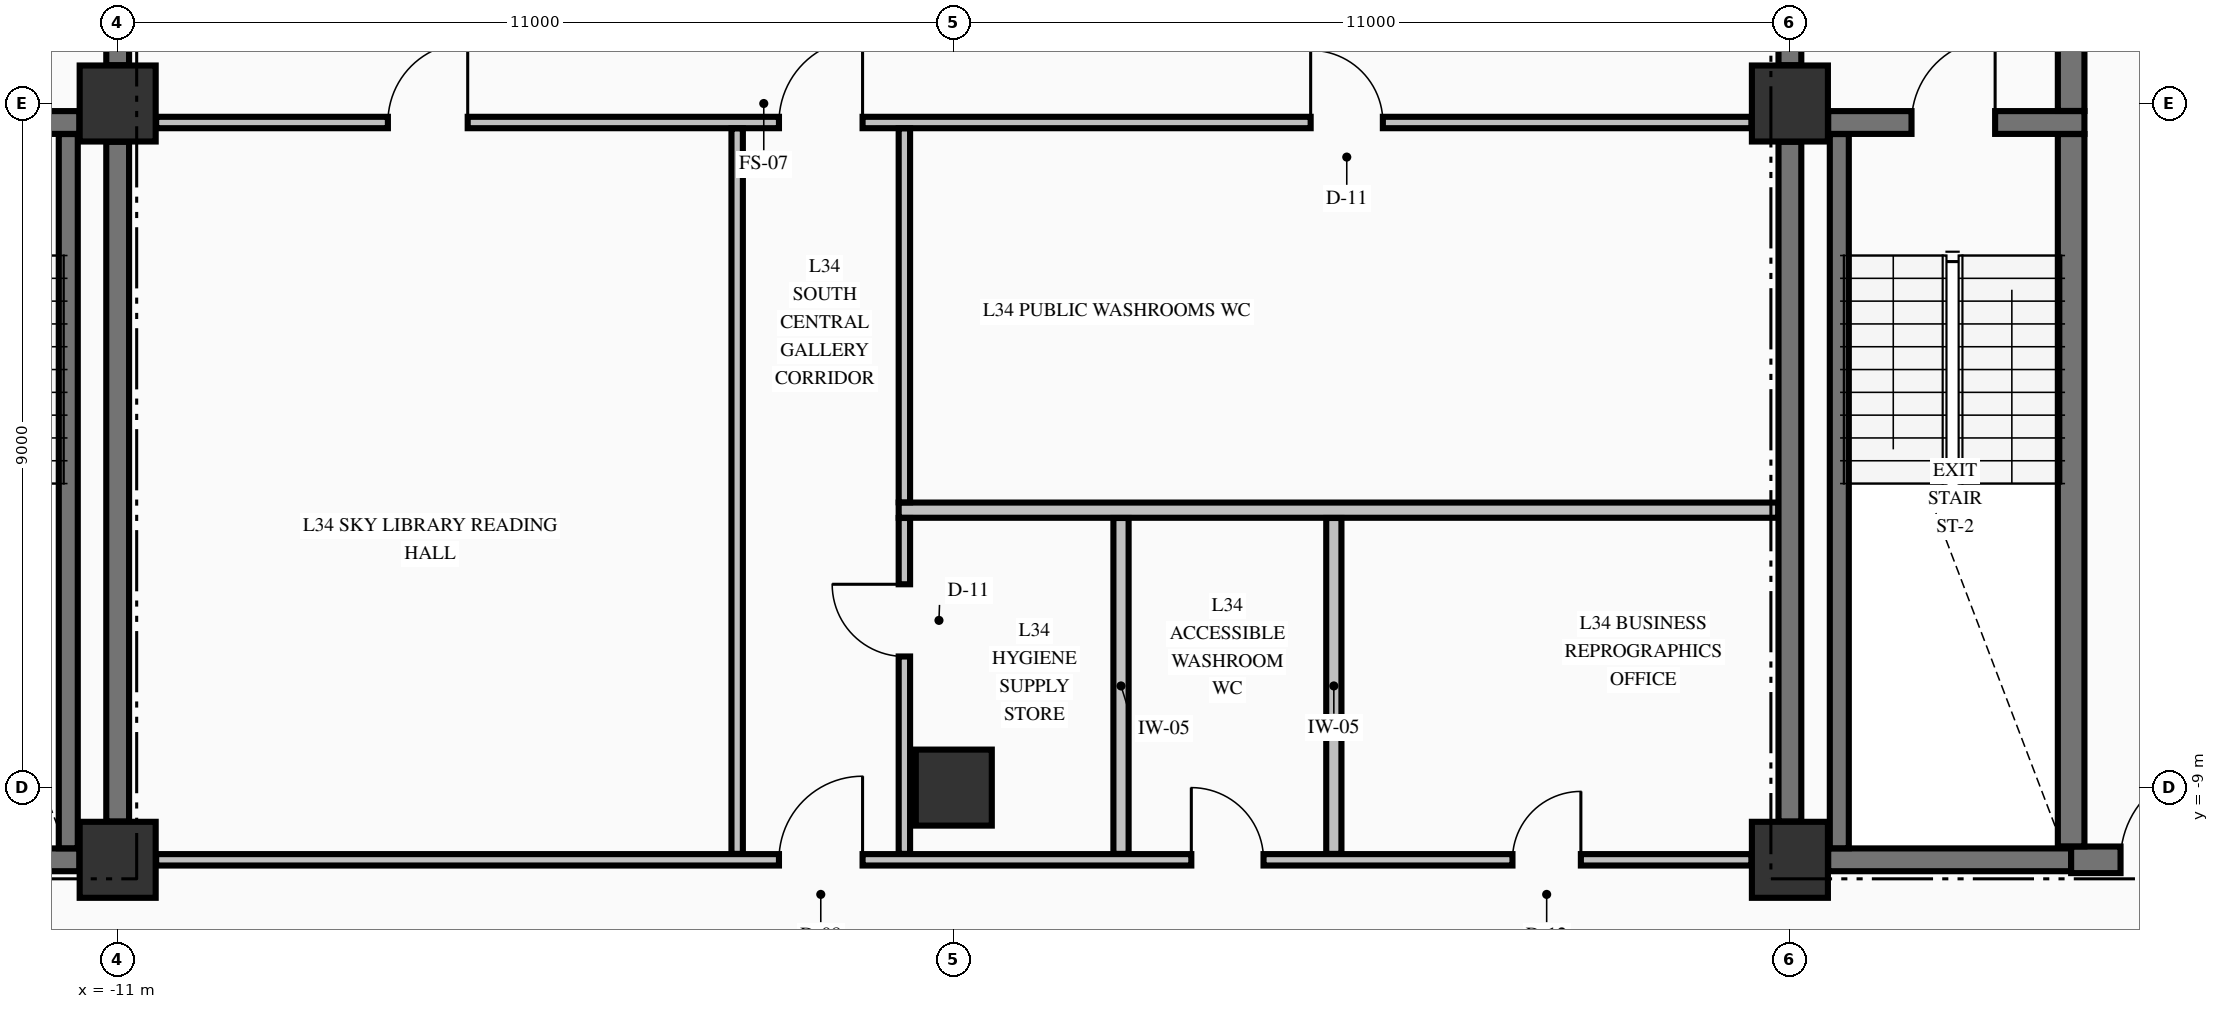
"""IFC4 building model, lengths in metres.
Left out: names, types, materials, properties, quantities, classifications, styles, units other than length and angle.
Written with IfcOpenShell. Run it as: python <this file> out.ifc"""

import sys

from ifc_helpers import new_model, si_unit, direction, frame, frame_2d, origin, origin_2d, place, context, subcontext, project, spatial, rectangle, extrude, element, fill, save


model = new_model("IFC4")
c1 = context("Model", 3, precision=1e-05, world=origin(), true_north=direction((0.0, 1.0)))
c2 = subcontext(c1, "Body", "Model", "MODEL_VIEW")
j1 = project(units=[si_unit("LENGTHUNIT", "METRE"), si_unit("PLANEANGLEUNIT", "RADIAN")], contexts=[c1])
p1 = place(None, origin())
s1 = spatial("IfcSite", under=j1, at=p1, CompositionType="ELEMENT")
p2 = place(p1, origin())
s2 = spatial("IfcBuilding", under=s1, at=p2, CompositionType="ELEMENT")
p3 = place(p2, frame((0.0, 0.0, 135.63)))
s3 = spatial("IfcBuildingStorey", under=s2, at=p3, CompositionType="ELEMENT", Elevation=135.63)
for number, where, z_axis, x_axis in (
    (1, (-11.0, -9.95, -0.25), (0.0, 0.0, 1.0), (1.0, 0.0, 0.0)),
    (2, (-11.0, 0.0, -0.25), (0.0, 0.0, 1.0), (1.0, 0.0, 0.0)),
    (3, (11.0, -9.95, -0.25), (0.0, 0.0, 1.0), (1.0, 0.0, 0.0)),
    (4, (11.0, 0.0, -0.25), (0.0, 0.0, 1.0), (1.0, 0.0, 0.0)),
    (5, (0.0, -9.0, -0.25), (0.0, 0.0, 1.0), (1.0, 0.0, 0.0)),
):
    element("IfcColumn", number, at=place(p3, frame(where, z_axis=z_axis, x_axis=x_axis)), inside=s3, PredefinedType="COLUMN", context=c2, shape_type="SweptSolid", body=[
        extrude(rectangle(XDim=1.0, YDim=1.0, at=origin_2d()), origin(), (0.0, 0.0, 1.0), 3.57),
    ])
for number, where, z_axis, x_axis in (
    (6, (-14.7, -9.95, 0.0), (0.0, 0.0, 1.0), (1.0, 0.0, 0.0)),
    (7, (11.504, -9.95, 0.0), (0.0, 0.0, 1.0), (1.0, 0.0, 0.0)),
):
    element("IfcWall", number, at=place(p3, frame(where, z_axis=z_axis, x_axis=x_axis)), inside=s3, PredefinedType="SHEAR", context=c2, shape_type="SweptSolid", body=[
        extrude(rectangle(XDim=3.196, YDim=0.3, at=frame_2d((1.598, 0.0))), origin(), (0.0, 0.0, 1.0), 3.32),
    ])
p4 = place(p3, frame((14.7, -9.95, 0.0), z_axis=(0.0, 0.0, 1.0), x_axis=(1.0, 0.0, 0.0)))
e8 = element("IfcWall", 8, at=p4, inside=s3, PredefinedType="SHEAR", context=c2, shape_type="SweptSolid", body=[
    extrude(rectangle(XDim=4.796, YDim=0.35, at=frame_2d((2.398, 0.0))), origin(), (0.0, 0.0, 1.0), 3.32),
])
p5 = place(p4, frame((0.65, 0.0, 0.0)))
e9 = element("IfcOpeningElement", 9, at=p5, cuts=e8, PredefinedType="OPENING", context=c2, shape_type="SweptSolid", body=[
    extrude(rectangle(XDim=1.2, YDim=2.15, at=frame_2d((0.6, 1.075))), frame((0.0, 0.185, 0.0), z_axis=(0.0, -1.0, 0.0), x_axis=(1.0, 0.0, 0.0)), (0.0, 0.0, 1.0), 0.37),
])
p6 = place(p3, frame((-19.496, -0.25, 0.0), z_axis=(0.0, 0.0, 1.0), x_axis=(1.0, 0.0, 0.0)))
e10 = element("IfcWall", 10, at=p6, inside=s3, PredefinedType="SHEAR", context=c2, shape_type="SweptSolid", body=[
    extrude(rectangle(XDim=7.992, YDim=0.3, at=frame_2d((3.996, 0.0))), origin(), (0.0, 0.0, 1.0), 3.32),
])
p7 = place(p6, frame((5.796, 0.0, 0.0)))
e11 = element("IfcOpeningElement", 11, at=p7, cuts=e10, PredefinedType="OPENING", context=c2, shape_type="SweptSolid", body=[
    extrude(rectangle(XDim=1.1, YDim=2.15, at=frame_2d((0.55, 1.075))), frame((0.0, 0.16, 0.0), z_axis=(0.0, -1.0, 0.0), x_axis=(1.0, 0.0, 0.0)), (0.0, 0.0, 1.0), 0.32),
])
p8 = place(p3, frame((11.504, -0.25, 0.0), z_axis=(0.0, 0.0, 1.0), x_axis=(1.0, 0.0, 0.0)))
e12 = element("IfcWall", 12, at=p8, inside=s3, PredefinedType="SHEAR", context=c2, shape_type="SweptSolid", body=[
    extrude(rectangle(XDim=3.371, YDim=0.3, at=frame_2d((1.686, 0.0))), origin(), (0.0, 0.0, 1.0), 3.32),
])
p9 = place(p8, frame((1.096, 0.0, 0.0)))
e13 = element("IfcOpeningElement", 13, at=p9, cuts=e12, PredefinedType="OPENING", context=c2, shape_type="SweptSolid", body=[
    extrude(rectangle(XDim=1.1, YDim=2.15, at=frame_2d((0.55, 1.075))), frame((0.0, 0.16, 0.0), z_axis=(0.0, -1.0, 0.0), x_axis=(1.0, 0.0, 0.0)), (0.0, 0.0, 1.0), 0.32),
])
p10 = place(p3, frame((-10.494, -9.95, 0.0), z_axis=(0.0, 0.0, 1.0), x_axis=(1.0, 0.0, 0.0)))
e14 = element("IfcWall", 14, at=p10, inside=s3, PredefinedType="PARTITIONING", context=c2, shape_type="SweptSolid", body=[
    extrude(rectangle(XDim=20.988, YDim=0.15, at=frame_2d((10.494, 0.0))), origin(), (0.0, 0.0, 1.0), 3.32),
])
p11 = place(p10, frame((8.194, 0.0, 0.0)))
e15 = element("IfcOpeningElement", 15, at=p11, cuts=e14, PredefinedType="OPENING", context=c2, shape_type="SweptSolid", body=[
    extrude(rectangle(XDim=1.1, YDim=2.15, at=frame_2d((0.55, 1.075))), frame((0.0, 0.085, 0.0), z_axis=(0.0, -1.0, 0.0), x_axis=(1.0, 0.0, 0.0)), (0.0, 0.0, 1.0), 0.17),
])
p12 = place(p10, frame((13.619, 0.0, 0.0)))
e16 = element("IfcOpeningElement", 16, at=p12, cuts=e14, PredefinedType="OPENING", context=c2, shape_type="SweptSolid", body=[
    extrude(rectangle(XDim=0.95, YDim=2.15, at=frame_2d((0.475, 1.075))), frame((0.0, 0.085, 0.0), z_axis=(0.0, -1.0, 0.0), x_axis=(1.0, 0.0, 0.0)), (0.0, 0.0, 1.0), 0.17),
])
p13 = place(p10, frame((17.844, 0.0, 0.0)))
e17 = element("IfcOpeningElement", 17, at=p13, cuts=e14, PredefinedType="OPENING", context=c2, shape_type="SweptSolid", body=[
    extrude(rectangle(XDim=0.9, YDim=2.15, at=frame_2d((0.45, 1.075))), frame((0.0, 0.085, 0.0), z_axis=(0.0, -1.0, 0.0), x_axis=(1.0, 0.0, 0.0)), (0.0, 0.0, 1.0), 0.17),
])
p14 = place(p3, frame((-0.725, -5.35, 0.0), z_axis=(0.0, 0.0, 1.0), x_axis=(1.0, 0.0, 0.0)))
e18 = element("IfcWall", 18, at=p14, inside=s3, PredefinedType="PARTITIONING", context=c2, shape_type="SweptSolid", body=[
    extrude(rectangle(XDim=11.572, YDim=0.2, at=frame_2d((5.786, 0.0))), origin(), (0.0, 0.0, 1.0), 3.32),
])
p15 = place(p3, frame((-10.494, -0.25, 0.0), z_axis=(0.0, 0.0, 1.0), x_axis=(1.0, 0.0, 0.0)))
e19 = element("IfcWall", 19, at=p15, inside=s3, PredefinedType="PARTITIONING", context=c2, shape_type="SweptSolid", body=[
    extrude(rectangle(XDim=20.988, YDim=0.15, at=frame_2d((10.494, 0.0))), origin(), (0.0, 0.0, 1.0), 3.32),
])
p16 = place(p15, frame((8.194, 0.0, 0.0)))
e20 = element("IfcOpeningElement", 20, at=p16, cuts=e19, PredefinedType="OPENING", context=c2, shape_type="SweptSolid", body=[
    extrude(rectangle(XDim=1.1, YDim=2.15, at=frame_2d((0.55, 1.075))), frame((0.0, 0.085, 0.0), z_axis=(0.0, -1.0, 0.0), x_axis=(1.0, 0.0, 0.0)), (0.0, 0.0, 1.0), 0.17),
])
p17 = place(p15, frame((3.049, 0.0, 0.0)))
e21 = element("IfcOpeningElement", 21, at=p17, cuts=e19, PredefinedType="OPENING", context=c2, shape_type="SweptSolid", body=[
    extrude(rectangle(XDim=1.05, YDim=2.15, at=frame_2d((0.525, 1.075))), frame((0.0, 0.085, 0.0), z_axis=(0.0, -1.0, 0.0), x_axis=(1.0, 0.0, 0.0)), (0.0, 0.0, 1.0), 0.17),
])
p18 = place(p15, frame((15.189, 0.0, 0.0)))
e22 = element("IfcOpeningElement", 22, at=p18, cuts=e19, PredefinedType="OPENING", context=c2, shape_type="SweptSolid", body=[
    extrude(rectangle(XDim=0.95, YDim=2.15, at=frame_2d((0.475, 1.075))), frame((0.0, 0.085, 0.0), z_axis=(0.0, -1.0, 0.0), x_axis=(1.0, 0.0, 0.0)), (0.0, 0.0, 1.0), 0.17),
])
p19 = place(p3, frame((-11.65, -9.798, 0.0), z_axis=(0.0, 0.0, 1.0), x_axis=(0.0, 1.0, 0.0)))
e23 = element("IfcWall", 23, at=p19, inside=s3, PredefinedType="SOLIDWALL", context=c2, shape_type="SweptSolid", body=[
    extrude(rectangle(XDim=9.396, YDim=0.25, at=frame_2d((4.698, 0.0))), origin(), (0.0, 0.0, 1.0), 3.32),
])
p20 = place(p3, frame((-11.0, -9.446, 0.0), z_axis=(0.0, 0.0, 1.0), x_axis=(0.0, 1.0, 0.0)))
e24 = element("IfcWall", 24, at=p20, inside=s3, PredefinedType="SHEAR", context=c2, shape_type="SweptSolid", body=[
    extrude(rectangle(XDim=8.942, YDim=0.3, at=frame_2d((4.471, 0.0))), origin(), (0.0, 0.0, 1.0), 3.32),
])
p21 = place(p3, frame((-11.0, 0.504, 0.0), z_axis=(0.0, 0.0, 1.0), x_axis=(0.0, 1.0, 0.0)))
e25 = element("IfcWall", 25, at=p21, inside=s3, PredefinedType="SHEAR", context=c2, shape_type="SweptSolid", body=[
    extrude(rectangle(XDim=2.244, YDim=0.3, at=frame_2d((1.122, 0.0))), origin(), (0.0, 0.0, 1.0), 3.32),
])
p22 = place(p21, frame((0.596, 0.0, 0.0)))
e26 = element("IfcOpeningElement", 26, at=p22, cuts=e25, PredefinedType="OPENING", context=c2, shape_type="SweptSolid", body=[
    extrude(rectangle(XDim=1.1, YDim=2.15, at=frame_2d((0.55, 1.075))), frame((0.0, 0.16, 0.0), z_axis=(0.0, -1.0, 0.0), x_axis=(1.0, 0.0, 0.0)), (0.0, 0.0, 1.0), 0.32),
])
p23 = place(p3, frame((11.0, -9.446, 0.0), z_axis=(0.0, 0.0, 1.0), x_axis=(0.0, 1.0, 0.0)))
e27 = element("IfcWall", 27, at=p23, inside=s3, PredefinedType="SHEAR", context=c2, shape_type="SweptSolid", body=[
    extrude(rectangle(XDim=8.942, YDim=0.3, at=frame_2d((4.471, 0.0))), origin(), (0.0, 0.0, 1.0), 3.32),
])
p24 = place(p3, frame((11.0, 0.504, 0.0), z_axis=(0.0, 0.0, 1.0), x_axis=(0.0, 1.0, 0.0)))
e28 = element("IfcWall", 28, at=p24, inside=s3, PredefinedType="SHEAR", context=c2, shape_type="SweptSolid", body=[
    extrude(rectangle(XDim=2.244, YDim=0.3, at=frame_2d((1.122, 0.0))), origin(), (0.0, 0.0, 1.0), 3.32),
])
p25 = place(p24, frame((0.596, 0.0, 0.0)))
e29 = element("IfcOpeningElement", 29, at=p25, cuts=e28, PredefinedType="OPENING", context=c2, shape_type="SweptSolid", body=[
    extrude(rectangle(XDim=1.1, YDim=2.15, at=frame_2d((0.55, 1.075))), frame((0.0, 0.16, 0.0), z_axis=(0.0, -1.0, 0.0), x_axis=(1.0, 0.0, 0.0)), (0.0, 0.0, 1.0), 0.32),
])
p26 = place(p3, frame((11.65, -9.798, 0.0), z_axis=(0.0, 0.0, 1.0), x_axis=(0.0, 1.0, 0.0)))
e30 = element("IfcWall", 30, at=p26, inside=s3, PredefinedType="SOLIDWALL", context=c2, shape_type="SweptSolid", body=[
    extrude(rectangle(XDim=9.396, YDim=0.25, at=frame_2d((4.698, 0.0))), origin(), (0.0, 0.0, 1.0), 3.32),
])
p27 = place(p3, frame((14.7, -9.773, 0.0), z_axis=(0.0, 0.0, 1.0), x_axis=(0.0, 1.0, 0.0)))
e31 = element("IfcWall", 31, at=p27, inside=s3, PredefinedType="SHEAR", context=c2, shape_type="SweptSolid", body=[
    extrude(rectangle(XDim=9.371, YDim=0.35, at=frame_2d((4.686, 0.0))), origin(), (0.0, 0.0, 1.0), 3.32),
])
p28 = place(p3, frame((14.7, -0.098, 0.0), z_axis=(0.0, 0.0, 1.0), x_axis=(0.0, 1.0, 0.0)))
e32 = element("IfcWall", 32, at=p28, inside=s3, PredefinedType="SHEAR", context=c2, shape_type="SweptSolid", body=[
    extrude(rectangle(XDim=2.846, YDim=0.35, at=frame_2d((1.423, 0.0))), origin(), (0.0, 0.0, 1.0), 3.32),
])
p29 = place(p3, frame((-2.85, -9.872, 0.0), z_axis=(0.0, 0.0, 1.0), x_axis=(0.0, 1.0, 0.0)))
e33 = element("IfcWall", 33, at=p29, inside=s3, PredefinedType="PARTITIONING", context=c2, shape_type="SweptSolid", body=[
    extrude(rectangle(XDim=9.544, YDim=0.15, at=frame_2d((4.772, 0.0))), origin(), (0.0, 0.0, 1.0), 3.32),
])
p30 = place(p3, frame((-0.65, -9.872, 0.0), z_axis=(0.0, 0.0, 1.0), x_axis=(0.0, 1.0, 0.0)))
e34 = element("IfcWall", 34, at=p30, inside=s3, PredefinedType="PARTITIONING", context=c2, shape_type="SweptSolid", body=[
    extrude(rectangle(XDim=4.419, YDim=0.15, at=frame_2d((2.209, 0.0))), origin(), (0.0, 0.0, 1.0), 3.32),
])
p31 = place(p30, frame((2.597, 0.0, 0.0)))
e35 = element("IfcOpeningElement", 35, at=p31, cuts=e34, PredefinedType="OPENING", context=c2, shape_type="SweptSolid", body=[
    extrude(rectangle(XDim=0.95, YDim=2.15, at=frame_2d((0.475, 1.075))), frame((0.0, 0.085, 0.0), z_axis=(0.0, -1.0, 0.0), x_axis=(1.0, 0.0, 0.0)), (0.0, 0.0, 1.0), 0.17),
])
p32 = place(p3, frame((-0.65, -5.247, 0.0), z_axis=(0.0, 0.0, 1.0), x_axis=(0.0, 1.0, 0.0)))
e36 = element("IfcWall", 36, at=p32, inside=s3, PredefinedType="PARTITIONING", context=c2, shape_type="SweptSolid", body=[
    extrude(rectangle(XDim=4.919, YDim=0.15, at=frame_2d((2.459, 0.0))), origin(), (0.0, 0.0, 1.0), 3.32),
])
for number, where, z_axis, x_axis in (
    (37, (2.2, -9.872, 0.0), (0.0, 0.0, 1.0), (0.0, 1.0, 0.0)),
    (38, (5.0, -9.872, 0.0), (0.0, 0.0, 1.0), (0.0, 1.0, 0.0)),
):
    element("IfcWall", number, at=place(p3, frame(where, z_axis=z_axis, x_axis=x_axis)), inside=s3, PredefinedType="PARTITIONING", context=c2, shape_type="SweptSolid", body=[
        extrude(rectangle(XDim=4.419, YDim=0.2, at=frame_2d((2.209, 0.0))), origin(), (0.0, 0.0, 1.0), 3.32),
    ])
p33 = place(p9, origin())
e39 = element("IfcDoor", 39, at=p33, inside=s3, OperationType="SINGLE_SWING_RIGHT", PredefinedType="DOOR", context=c2, shape_type="SweptSolid", body=[
    extrude(rectangle(XDim=1.1, YDim=2.15, at=frame_2d((0.55, 1.075))), frame((0.0, 0.025, 0.0), z_axis=(0.0, -1.0, 0.0), x_axis=(1.0, 0.0, 0.0)), (0.0, 0.0, 1.0), 0.05),
])
fill(e13, e39)
p34 = place(p5, origin())
e40 = element("IfcDoor", 40, at=p34, inside=s3, OperationType="SINGLE_SWING_RIGHT", PredefinedType="DOOR", context=c2, shape_type="SweptSolid", body=[
    extrude(rectangle(XDim=1.2, YDim=2.15, at=frame_2d((0.6, 1.075))), frame((0.0, 0.025, 0.0), z_axis=(0.0, -1.0, 0.0), x_axis=(1.0, 0.0, 0.0)), (0.0, 0.0, 1.0), 0.05),
])
fill(e9, e40)
p35 = place(p11, origin())
e41 = element("IfcDoor", 41, at=p35, inside=s3, OperationType="SINGLE_SWING_RIGHT", PredefinedType="DOOR", context=c2, shape_type="SweptSolid", body=[
    extrude(rectangle(XDim=1.1, YDim=2.15, at=frame_2d((0.55, 1.075))), frame((0.0, 0.025, 0.0), z_axis=(0.0, -1.0, 0.0), x_axis=(1.0, 0.0, 0.0)), (0.0, 0.0, 1.0), 0.05),
])
fill(e15, e41)
p36 = place(p16, origin())
e42 = element("IfcDoor", 42, at=p36, inside=s3, OperationType="SINGLE_SWING_RIGHT", PredefinedType="DOOR", context=c2, shape_type="SweptSolid", body=[
    extrude(rectangle(XDim=1.1, YDim=2.15, at=frame_2d((0.55, 1.075))), frame((0.0, 0.025, 0.0), z_axis=(0.0, -1.0, 0.0), x_axis=(1.0, 0.0, 0.0)), (0.0, 0.0, 1.0), 0.05),
])
fill(e20, e42)
p37 = place(p17, origin())
e43 = element("IfcDoor", 43, at=p37, inside=s3, OperationType="SINGLE_SWING_RIGHT", PredefinedType="DOOR", context=c2, shape_type="SweptSolid", body=[
    extrude(rectangle(XDim=1.05, YDim=2.15, at=frame_2d((0.525, 1.075))), frame((0.0, 0.025, 0.0), z_axis=(0.0, -1.0, 0.0), x_axis=(1.0, 0.0, 0.0)), (0.0, 0.0, 1.0), 0.05),
])
fill(e21, e43)
p38 = place(p18, origin())
e44 = element("IfcDoor", 44, at=p38, inside=s3, OperationType="SINGLE_SWING_LEFT", PredefinedType="DOOR", context=c2, shape_type="SweptSolid", body=[
    extrude(rectangle(XDim=0.95, YDim=2.15, at=frame_2d((0.475, 1.075))), frame((0.0, 0.025, 0.0), z_axis=(0.0, -1.0, 0.0), x_axis=(1.0, 0.0, 0.0)), (0.0, 0.0, 1.0), 0.05),
])
fill(e22, e44)
p39 = place(p31, origin())
e45 = element("IfcDoor", 45, at=p39, inside=s3, OperationType="SINGLE_SWING_RIGHT", PredefinedType="DOOR", context=c2, shape_type="SweptSolid", body=[
    extrude(rectangle(XDim=0.95, YDim=2.15, at=frame_2d((0.475, 1.075))), frame((0.0, 0.025, 0.0), z_axis=(0.0, -1.0, 0.0), x_axis=(1.0, 0.0, 0.0)), (0.0, 0.0, 1.0), 0.05),
])
fill(e35, e45)
p40 = place(p12, origin())
e46 = element("IfcDoor", 46, at=p40, inside=s3, OperationType="SINGLE_SWING_LEFT", PredefinedType="DOOR", context=c2, shape_type="SweptSolid", body=[
    extrude(rectangle(XDim=0.95, YDim=2.15, at=frame_2d((0.475, 1.075))), frame((0.0, 0.025, 0.0), z_axis=(0.0, -1.0, 0.0), x_axis=(1.0, 0.0, 0.0)), (0.0, 0.0, 1.0), 0.05),
])
fill(e16, e46)
p41 = place(p13, origin())
e47 = element("IfcDoor", 47, at=p41, inside=s3, OperationType="SINGLE_SWING_RIGHT", PredefinedType="DOOR", context=c2, shape_type="SweptSolid", body=[
    extrude(rectangle(XDim=0.9, YDim=2.15, at=frame_2d((0.45, 1.075))), frame((0.0, 0.025, 0.0), z_axis=(0.0, -1.0, 0.0), x_axis=(1.0, 0.0, 0.0)), (0.0, 0.0, 1.0), 0.05),
])
fill(e17, e47)
save(model, sys.argv[1])
